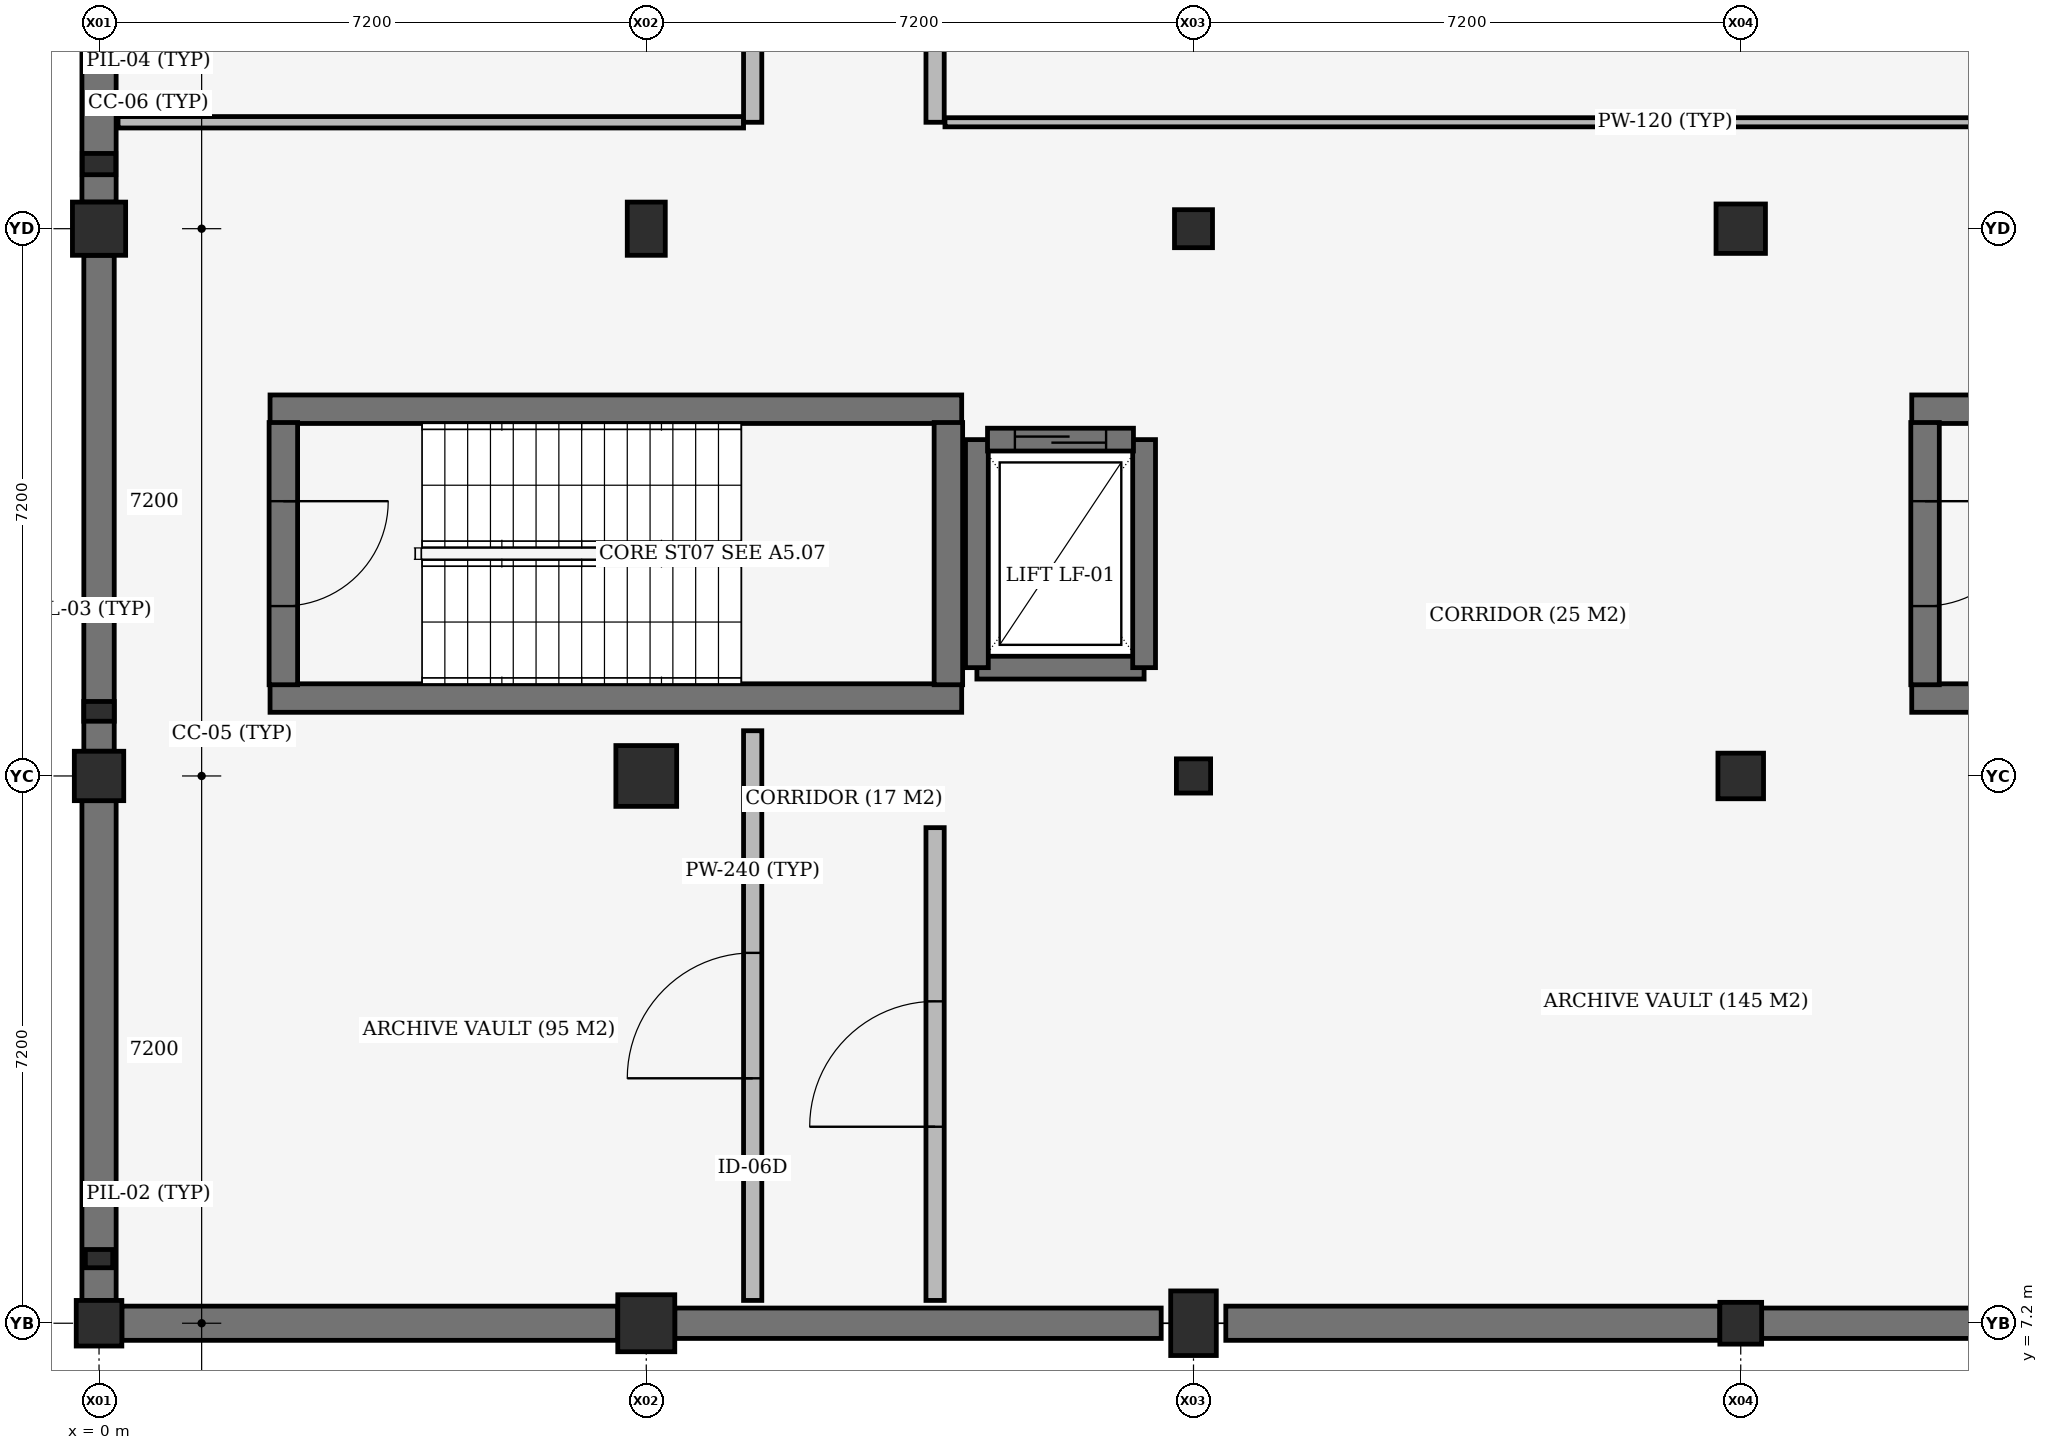
"""IFC4 building model, lengths in metres.
Left out: names, types, materials, properties, quantities, classifications, styles, units other than length and angle.
Written with IfcOpenShell. Run it as: python <this file> out.ifc"""

import sys

from ifc_helpers import new_model, si_unit, direction, frame, frame_2d, origin, origin_2d, place, context, subcontext, project, spatial, rectangle, extrude, element, fill, save


model = new_model("IFC4")
c1 = context("Model", 3, precision=1e-05, world=origin(), true_north=direction((0.0, 1.0)))
c2 = subcontext(c1, "Body", "Model", "MODEL_VIEW")
j1 = project(units=[si_unit("LENGTHUNIT", "METRE"), si_unit("PLANEANGLEUNIT", "RADIAN")], contexts=[c1])
p1 = place(None, origin())
s1 = spatial("IfcSite", under=j1, at=p1, CompositionType="ELEMENT")
p2 = place(p1, origin())
s2 = spatial("IfcBuilding", under=s1, at=p2, CompositionType="ELEMENT")
p3 = place(p2, frame((0.0, 0.0, -4.5)))
s3 = spatial("IfcBuildingStorey", under=s2, at=p3, CompositionType="ELEMENT", Elevation=-4.5)
p4 = place(p3, frame((0.0, 7.2, -0.42), z_axis=(0.0, 0.0, 1.0), x_axis=(1.0, 0.0, 0.0)))
e1 = element("IfcColumn", 1, at=p4, inside=s3, PredefinedType="COLUMN", context=c2, shape_type="SweptSolid", body=[
    extrude(rectangle(XDim=0.6, YDim=0.6, at=origin_2d()), origin(), (0.0, 0.0, 1.0), 4.6),
])
p5 = place(p3, frame((0.0, 14.4, -0.42), z_axis=(0.0, 0.0, 1.0), x_axis=(1.0, 0.0, 0.0)))
e2 = element("IfcColumn", 2, at=p5, inside=s3, PredefinedType="COLUMN", context=c2, shape_type="SweptSolid", body=[
    extrude(rectangle(XDim=0.65, YDim=0.65, at=origin_2d()), origin(), (0.0, 0.0, 1.0), 4.6),
])
p6 = place(p3, frame((0.0, 21.6, -0.42), z_axis=(0.0, 0.0, 1.0), x_axis=(1.0, 0.0, 0.0)))
e3 = element("IfcColumn", 3, at=p6, inside=s3, PredefinedType="COLUMN", context=c2, shape_type="SweptSolid", body=[
    extrude(rectangle(XDim=0.7, YDim=0.7, at=origin_2d()), origin(), (0.0, 0.0, 1.0), 4.6),
])
p7 = place(p3, frame((7.2, 7.2, -0.42), z_axis=(0.0, 0.0, 1.0), x_axis=(1.0, 0.0, 0.0)))
e4 = element("IfcColumn", 4, at=p7, inside=s3, PredefinedType="COLUMN", context=c2, shape_type="SweptSolid", body=[
    extrude(rectangle(XDim=0.75, YDim=0.75, at=origin_2d()), origin(), (0.0, 0.0, 1.0), 4.6),
])
p8 = place(p3, frame((7.2, 14.4, -0.42), z_axis=(0.0, 0.0, 1.0), x_axis=(1.0, 0.0, 0.0)))
e5 = element("IfcColumn", 5, at=p8, inside=s3, PredefinedType="COLUMN", context=c2, shape_type="SweptSolid", body=[
    extrude(rectangle(XDim=0.8, YDim=0.8, at=origin_2d()), origin(), (0.0, 0.0, 1.0), 4.6),
])
p9 = place(p3, frame((7.2, 21.6, -0.42), z_axis=(0.0, 0.0, 1.0), x_axis=(1.0, 0.0, 0.0)))
e6 = element("IfcColumn", 6, at=p9, inside=s3, PredefinedType="COLUMN", context=c2, shape_type="SweptSolid", body=[
    extrude(rectangle(XDim=0.5, YDim=0.7, at=origin_2d()), origin(), (0.0, 0.0, 1.0), 4.6),
])
p10 = place(p3, frame((14.4, 7.2, -0.42), z_axis=(0.0, 0.0, 1.0), x_axis=(1.0, 0.0, 0.0)))
e7 = element("IfcColumn", 7, at=p10, inside=s3, PredefinedType="COLUMN", context=c2, shape_type="SweptSolid", body=[
    extrude(rectangle(XDim=0.6, YDim=0.85, at=origin_2d()), origin(), (0.0, 0.0, 1.0), 4.6),
])
p11 = place(p3, frame((14.4, 14.4, -0.42), z_axis=(0.0, 0.0, 1.0), x_axis=(1.0, 0.0, 0.0)))
e8 = element("IfcColumn", 8, at=p11, inside=s3, PredefinedType="COLUMN", context=c2, shape_type="SweptSolid", body=[
    extrude(rectangle(XDim=0.45, YDim=0.45, at=origin_2d()), origin(), (0.0, 0.0, 1.0), 4.6),
])
p12 = place(p3, frame((14.4, 21.6, -0.42), z_axis=(0.0, 0.0, 1.0), x_axis=(1.0, 0.0, 0.0)))
e9 = element("IfcColumn", 9, at=p12, inside=s3, PredefinedType="COLUMN", context=c2, shape_type="SweptSolid", body=[
    extrude(rectangle(XDim=0.5, YDim=0.5, at=origin_2d()), origin(), (0.0, 0.0, 1.0), 4.6),
])
p13 = place(p3, frame((21.6, 7.2, -0.42), z_axis=(0.0, 0.0, 1.0), x_axis=(1.0, 0.0, 0.0)))
e10 = element("IfcColumn", 10, at=p13, inside=s3, PredefinedType="COLUMN", context=c2, shape_type="SweptSolid", body=[
    extrude(rectangle(XDim=0.55, YDim=0.55, at=origin_2d()), origin(), (0.0, 0.0, 1.0), 4.6),
])
p14 = place(p3, frame((21.6, 14.4, -0.42), z_axis=(0.0, 0.0, 1.0), x_axis=(1.0, 0.0, 0.0)))
e11 = element("IfcColumn", 11, at=p14, inside=s3, PredefinedType="COLUMN", context=c2, shape_type="SweptSolid", body=[
    extrude(rectangle(XDim=0.6, YDim=0.6, at=origin_2d()), origin(), (0.0, 0.0, 1.0), 4.6),
])
p15 = place(p3, frame((21.6, 21.6, -0.42), z_axis=(0.0, 0.0, 1.0), x_axis=(1.0, 0.0, 0.0)))
e12 = element("IfcColumn", 12, at=p15, inside=s3, PredefinedType="COLUMN", context=c2, shape_type="SweptSolid", body=[
    extrude(rectangle(XDim=0.65, YDim=0.65, at=origin_2d()), origin(), (0.0, 0.0, 1.0), 4.6),
])
p16 = place(p3, frame((0.0, 8.05, -0.42), z_axis=(0.0, 0.0, 1.0), x_axis=(1.0, 0.0, 0.0)))
e13 = element("IfcColumn", 13, at=p16, inside=s3, PredefinedType="PILASTER", context=c2, shape_type="SweptSolid", body=[
    extrude(rectangle(XDim=0.36, YDim=0.24, at=origin_2d()), origin(), (0.0, 0.0, 1.0), 4.6),
])
p17 = place(p3, frame((0.0, 15.25, -0.42), z_axis=(0.0, 0.0, 1.0), x_axis=(1.0, 0.0, 0.0)))
e14 = element("IfcColumn", 14, at=p17, inside=s3, PredefinedType="PILASTER", context=c2, shape_type="SweptSolid", body=[
    extrude(rectangle(XDim=0.4, YDim=0.26, at=origin_2d()), origin(), (0.0, 0.0, 1.0), 4.6),
])
p18 = place(p3, frame((0.0, 22.45, -0.42), z_axis=(0.0, 0.0, 1.0), x_axis=(1.0, 0.0, 0.0)))
e15 = element("IfcColumn", 15, at=p18, inside=s3, PredefinedType="PILASTER", context=c2, shape_type="SweptSolid", body=[
    extrude(rectangle(XDim=0.44, YDim=0.28, at=origin_2d()), origin(), (0.0, 0.0, 1.0), 4.6),
])
for number, where, z_axis, x_axis in (
    (16, (2.25, 15.425, 0.0), (0.0, 0.0, 1.0), (1.0, 0.0, 0.0)),
    (17, (11.35, 19.225, 0.0), (0.0, 0.0, 1.0), (-1.0, 0.0, 0.0)),
):
    element("IfcWall", number, at=place(p3, frame(where, z_axis=z_axis, x_axis=x_axis)), inside=s3, PredefinedType="SHEAR", context=c2, shape_type="SweptSolid", body=[
        extrude(rectangle(XDim=9.1, YDim=0.375, at=frame_2d((4.55, 0.0))), origin(), (0.0, 0.0, 1.0), 4.18),
    ])
p19 = place(p3, frame((11.175, 15.6, 0.0), z_axis=(0.0, 0.0, 1.0), x_axis=(0.0, 1.0, 0.0)))
e18 = element("IfcWall", 18, at=p19, inside=s3, PredefinedType="SHEAR", context=c2, shape_type="SweptSolid", body=[
    extrude(rectangle(XDim=3.45, YDim=0.375, at=frame_2d((1.725, 0.0))), origin(), (0.0, 0.0, 1.0), 4.18),
])
for number, where, z_axis, x_axis in (
    (19, (23.85, 15.425, 0.0), (0.0, 0.0, 1.0), (1.0, 0.0, 0.0)),
    (20, (32.95, 19.225, 0.0), (0.0, 0.0, 1.0), (-1.0, 0.0, 0.0)),
):
    element("IfcWall", number, at=place(p3, frame(where, z_axis=z_axis, x_axis=x_axis)), inside=s3, PredefinedType="SHEAR", context=c2, shape_type="SweptSolid", body=[
        extrude(rectangle(XDim=9.1, YDim=0.375, at=frame_2d((4.55, 0.0))), origin(), (0.0, 0.0, 1.0), 4.18),
    ])
p20 = place(p3, frame((11.55, 15.825, 0.0), z_axis=(0.0, 0.0, 1.0), x_axis=(1.0, 0.0, 0.0)))
e21 = element("IfcWall", 21, at=p20, inside=s3, PredefinedType="SHEAR", context=c2, shape_type="SweptSolid", body=[
    extrude(rectangle(XDim=2.2, YDim=0.3, at=frame_2d((1.1, 0.0))), origin(), (0.0, 0.0, 1.0), 4.18),
])
for number, where, z_axis, x_axis in (
    (22, (11.55, 18.825, 0.0), (0.0, 0.0, 1.0), (0.0, -1.0, 0.0)),
    (23, (13.75, 15.825, 0.0), (0.0, 0.0, 1.0), (0.0, 1.0, 0.0)),
):
    element("IfcWall", number, at=place(p3, frame(where, z_axis=z_axis, x_axis=x_axis)), inside=s3, PredefinedType="SHEAR", context=c2, shape_type="SweptSolid", body=[
        extrude(rectangle(XDim=3.0, YDim=0.3, at=frame_2d((1.5, 0.0))), origin(), (0.0, 0.0, 1.0), 4.18),
    ])
p21 = place(p3, frame((0.3, 7.2, 0.0), z_axis=(0.0, 0.0, 1.0), x_axis=(1.0, 0.0, 0.0)))
e24 = element("IfcWall", 24, at=p21, inside=s3, PredefinedType="USERDEFINED", context=c2, shape_type="SweptSolid", body=[
    extrude(rectangle(XDim=6.525, YDim=0.45, at=frame_2d((3.262, 0.0))), origin(), (0.0, 0.0, 1.0), 4.18),
])
p22 = place(p3, frame((7.575, 7.2, 0.0), z_axis=(0.0, 0.0, 1.0), x_axis=(1.0, 0.0, 0.0)))
e25 = element("IfcWall", 25, at=p22, inside=s3, PredefinedType="USERDEFINED", context=c2, shape_type="SweptSolid", body=[
    extrude(rectangle(XDim=6.4, YDim=0.4, at=frame_2d((3.2, 0.0))), origin(), (0.0, 0.0, 1.0), 4.18),
])
p23 = place(p3, frame((14.825, 7.2, 0.0), z_axis=(0.0, 0.0, 1.0), x_axis=(1.0, 0.0, 0.0)))
e26 = element("IfcWall", 26, at=p23, inside=s3, PredefinedType="USERDEFINED", context=c2, shape_type="SweptSolid", body=[
    extrude(rectangle(XDim=6.5, YDim=0.45, at=frame_2d((3.25, 0.0))), origin(), (0.0, 0.0, 1.0), 4.18),
])
p24 = place(p3, frame((21.875, 7.2, 0.0), z_axis=(0.0, 0.0, 1.0), x_axis=(1.0, 0.0, 0.0)))
e27 = element("IfcWall", 27, at=p24, inside=s3, PredefinedType="USERDEFINED", context=c2, shape_type="SweptSolid", body=[
    extrude(rectangle(XDim=6.65, YDim=0.4, at=frame_2d((3.325, 0.0))), origin(), (0.0, 0.0, 1.0), 4.18),
])
p25 = place(p3, frame((0.0, 7.5, 0.0), z_axis=(0.0, 0.0, 1.0), x_axis=(0.0, 1.0, 0.0)))
e28 = element("IfcWall", 28, at=p25, inside=s3, PredefinedType="USERDEFINED", context=c2, shape_type="SweptSolid", body=[
    extrude(rectangle(XDim=6.575, YDim=0.45, at=frame_2d((3.288, 0.0))), origin(), (0.0, 0.0, 1.0), 4.18),
])
p26 = place(p3, frame((0.0, 14.725, 0.0), z_axis=(0.0, 0.0, 1.0), x_axis=(0.0, 1.0, 0.0)))
e29 = element("IfcWall", 29, at=p26, inside=s3, PredefinedType="USERDEFINED", context=c2, shape_type="SweptSolid", body=[
    extrude(rectangle(XDim=6.525, YDim=0.4, at=frame_2d((3.262, 0.0))), origin(), (0.0, 0.0, 1.0), 4.18),
])
p27 = place(p3, frame((0.0, 21.95, 0.0), z_axis=(0.0, 0.0, 1.0), x_axis=(0.0, 1.0, 0.0)))
e30 = element("IfcWall", 30, at=p27, inside=s3, PredefinedType="USERDEFINED", context=c2, shape_type="SweptSolid", body=[
    extrude(rectangle(XDim=6.475, YDim=0.45, at=frame_2d((3.238, 0.0))), origin(), (0.0, 0.0, 1.0), 4.18),
])
p28 = place(p3, frame((2.425, 19.05, 0.0), z_axis=(0.0, 0.0, 1.0), x_axis=(0.0, -1.0, 0.0)))
e31 = element("IfcWall", 31, at=p28, inside=s3, PredefinedType="SHEAR", context=c2, shape_type="SweptSolid", body=[
    extrude(rectangle(XDim=3.45, YDim=0.375, at=frame_2d((1.725, 0.0))), origin(), (0.0, 0.0, 1.0), 4.18),
])
p29 = place(p28, frame((1.035, 0.0, 0.0)))
e32 = element("IfcOpeningElement", 32, at=p29, cuts=e31, PredefinedType="OPENING", context=c2, shape_type="SweptSolid", body=[
    extrude(rectangle(XDim=1.38, YDim=2.2, at=frame_2d((0.69, 1.1))), frame((0.0, 0.198, 0.0), z_axis=(0.0, -1.0, 0.0), x_axis=(1.0, 0.0, 0.0)), (0.0, 0.0, 1.0), 0.395),
])
p30 = place(p3, frame((24.025, 19.05, 0.0), z_axis=(0.0, 0.0, 1.0), x_axis=(0.0, -1.0, 0.0)))
e33 = element("IfcWall", 33, at=p30, inside=s3, PredefinedType="SHEAR", context=c2, shape_type="SweptSolid", body=[
    extrude(rectangle(XDim=3.45, YDim=0.375, at=frame_2d((1.725, 0.0))), origin(), (0.0, 0.0, 1.0), 4.18),
])
p31 = place(p30, frame((1.035, 0.0, 0.0)))
e34 = element("IfcOpeningElement", 34, at=p31, cuts=e33, PredefinedType="OPENING", context=c2, shape_type="SweptSolid", body=[
    extrude(rectangle(XDim=1.38, YDim=2.2, at=frame_2d((0.69, 1.1))), frame((0.0, 0.198, 0.0), z_axis=(0.0, -1.0, 0.0), x_axis=(1.0, 0.0, 0.0)), (0.0, 0.0, 1.0), 0.395),
])
p32 = place(p3, frame((11.69, 18.825, 0.0), z_axis=(0.0, 0.0, 1.0), x_axis=(1.0, 0.0, 0.0)))
e35 = element("IfcWall", 35, at=p32, inside=s3, PredefinedType="SHEAR", context=c2, shape_type="SweptSolid", body=[
    extrude(rectangle(XDim=1.92, YDim=0.3, at=frame_2d((0.96, 0.0))), origin(), (0.0, 0.0, 1.0), 4.18),
])
p33 = place(p32, frame((0.36, 0.0, 0.0)))
e36 = element("IfcOpeningElement", 36, at=p33, cuts=e35, PredefinedType="OPENING", context=c2, shape_type="SweptSolid", body=[
    extrude(rectangle(XDim=1.2, YDim=2.1, at=frame_2d((0.6, 1.05))), frame((0.0, 0.16, 0.0), z_axis=(0.0, -1.0, 0.0), x_axis=(1.0, 0.0, 0.0)), (0.0, 0.0, 1.0), 0.32),
])
p34 = place(p3, frame((8.6, 7.5, 0.0), z_axis=(0.0, 0.0, 1.0), x_axis=(0.0, 1.0, 0.0)))
e37 = element("IfcWall", 37, at=p34, inside=s3, PredefinedType="STANDARD", context=c2, shape_type="SweptSolid", body=[
    extrude(rectangle(XDim=7.495, YDim=0.24, at=frame_2d((3.748, 0.0))), origin(), (0.0, 0.0, 1.0), 3.38),
])
p35 = place(p34, frame((2.923, 0.0, 0.0)))
e38 = element("IfcOpeningElement", 38, at=p35, cuts=e37, PredefinedType="OPENING", context=c2, shape_type="SweptSolid", body=[
    extrude(rectangle(XDim=1.65, YDim=2.25, at=frame_2d((0.825, 1.125))), frame((0.0, 0.13, 0.0), z_axis=(0.0, -1.0, 0.0), x_axis=(1.0, 0.0, 0.0)), (0.0, 0.0, 1.0), 0.26),
])
p36 = place(p3, frame((0.25, 23.0, 0.0), z_axis=(0.0, 0.0, 1.0), x_axis=(1.0, 0.0, 0.0)))
e39 = element("IfcWall", 39, at=p36, inside=s3, PredefinedType="PARTITIONING", context=c2, shape_type="SweptSolid", body=[
    extrude(rectangle(XDim=8.23, YDim=0.15, at=frame_2d((4.115, 0.0))), origin(), (0.0, 0.0, 1.0), 3.48),
])
p37 = place(p3, frame((8.6, 23.0, 0.0), z_axis=(0.0, 0.0, 1.0), x_axis=(0.0, 1.0, 0.0)))
e40 = element("IfcWall", 40, at=p37, inside=s3, PredefinedType="STANDARD", context=c2, shape_type="SweptSolid", body=[
    extrude(rectangle(XDim=8.595, YDim=0.24, at=frame_2d((4.297, 0.0))), origin(), (0.0, 0.0, 1.0), 3.53),
])
p38 = place(p37, frame((3.472, 0.0, 0.0)))
e41 = element("IfcOpeningElement", 41, at=p38, cuts=e40, PredefinedType="OPENING", context=c2, shape_type="SweptSolid", body=[
    extrude(rectangle(XDim=1.65, YDim=2.25, at=frame_2d((0.825, 1.125))), frame((0.0, 0.13, 0.0), z_axis=(0.0, -1.0, 0.0), x_axis=(1.0, 0.0, 0.0)), (0.0, 0.0, 1.0), 0.26),
])
p39 = place(p3, frame((11.0, 7.5, 0.0), z_axis=(0.0, 0.0, 1.0), x_axis=(0.0, 1.0, 0.0)))
e42 = element("IfcWall", 42, at=p39, inside=s3, PredefinedType="STANDARD", context=c2, shape_type="SweptSolid", body=[
    extrude(rectangle(XDim=6.22, YDim=0.24, at=frame_2d((3.11, 0.0))), origin(), (0.0, 0.0, 1.0), 4.18),
])
p40 = place(p39, frame((2.285, 0.0, 0.0)))
e43 = element("IfcOpeningElement", 43, at=p40, cuts=e42, PredefinedType="OPENING", context=c2, shape_type="SweptSolid", body=[
    extrude(rectangle(XDim=1.65, YDim=2.25, at=frame_2d((0.825, 1.125))), frame((0.0, 0.13, 0.0), z_axis=(0.0, -1.0, 0.0), x_axis=(1.0, 0.0, 0.0)), (0.0, 0.0, 1.0), 0.26),
])
p41 = place(p3, frame((11.0, 23.0, 0.0), z_axis=(0.0, 0.0, 1.0), x_axis=(0.0, 1.0, 0.0)))
e44 = element("IfcWall", 44, at=p41, inside=s3, PredefinedType="STANDARD", context=c2, shape_type="SweptSolid", body=[
    extrude(rectangle(XDim=19.375, YDim=0.24, at=frame_2d((9.688, 0.0))), origin(), (0.0, 0.0, 1.0), 3.48),
])
p42 = place(p41, frame((8.863, 0.0, 0.0)))
e45 = element("IfcOpeningElement", 45, at=p42, cuts=e44, PredefinedType="OPENING", context=c2, shape_type="SweptSolid", body=[
    extrude(rectangle(XDim=1.65, YDim=2.25, at=frame_2d((0.825, 1.125))), frame((0.0, 0.13, 0.0), z_axis=(0.0, -1.0, 0.0), x_axis=(1.0, 0.0, 0.0)), (0.0, 0.0, 1.0), 0.26),
])
p43 = place(p3, frame((11.13, 23.0, 0.0), z_axis=(0.0, 0.0, 1.0), x_axis=(1.0, 0.0, 0.0)))
e46 = element("IfcWall", 46, at=p43, inside=s3, PredefinedType="PARTITIONING", context=c2, shape_type="SweptSolid", body=[
    extrude(rectangle(XDim=18.95, YDim=0.12, at=frame_2d((9.475, 0.0))), origin(), (0.0, 0.0, 1.0), 3.38),
])
p44 = place(p29, origin())
e47 = element("IfcDoor", 47, at=p44, inside=s3, OperationType="DOUBLE_DOOR_SINGLE_SWING", PredefinedType="DOOR", context=c2, shape_type="SweptSolid", body=[
    extrude(rectangle(XDim=1.38, YDim=2.2, at=frame_2d((0.69, 1.1))), frame((0.0, 0.025, 0.0), z_axis=(0.0, -1.0, 0.0), x_axis=(1.0, 0.0, 0.0)), (0.0, 0.0, 1.0), 0.05),
])
fill(e32, e47)
p45 = place(p31, origin())
e48 = element("IfcDoor", 48, at=p45, inside=s3, OperationType="DOUBLE_DOOR_SINGLE_SWING", PredefinedType="DOOR", context=c2, shape_type="SweptSolid", body=[
    extrude(rectangle(XDim=1.38, YDim=2.2, at=frame_2d((0.69, 1.1))), frame((0.0, 0.025, 0.0), z_axis=(0.0, -1.0, 0.0), x_axis=(1.0, 0.0, 0.0)), (0.0, 0.0, 1.0), 0.05),
])
fill(e34, e48)
p46 = place(p33, origin())
e49 = element("IfcDoor", 49, at=p46, inside=s3, OperationType="SLIDING_TO_LEFT", PredefinedType="DOOR", context=c2, shape_type="SweptSolid", body=[
    extrude(rectangle(XDim=1.2, YDim=2.1, at=frame_2d((0.6, 1.05))), frame((0.0, 0.025, 0.0), z_axis=(0.0, -1.0, 0.0), x_axis=(1.0, 0.0, 0.0)), (0.0, 0.0, 1.0), 0.05),
])
fill(e36, e49)
p47 = place(p35, origin())
e50 = element("IfcDoor", 50, at=p47, inside=s3, OperationType="DOUBLE_DOOR_SINGLE_SWING", PredefinedType="DOOR", context=c2, shape_type="SweptSolid", body=[
    extrude(rectangle(XDim=1.65, YDim=2.25, at=frame_2d((0.825, 1.125))), frame((0.0, 0.025, 0.0), z_axis=(0.0, -1.0, 0.0), x_axis=(1.0, 0.0, 0.0)), (0.0, 0.0, 1.0), 0.05),
])
fill(e38, e50)
p48 = place(p40, origin())
e51 = element("IfcDoor", 51, at=p48, inside=s3, OperationType="DOUBLE_DOOR_SINGLE_SWING", PredefinedType="DOOR", context=c2, shape_type="SweptSolid", body=[
    extrude(rectangle(XDim=1.65, YDim=2.25, at=frame_2d((0.825, 1.125))), frame((0.0, 0.025, 0.0), z_axis=(0.0, -1.0, 0.0), x_axis=(1.0, 0.0, 0.0)), (0.0, 0.0, 1.0), 0.05),
])
fill(e43, e51)
save(model, sys.argv[1])
